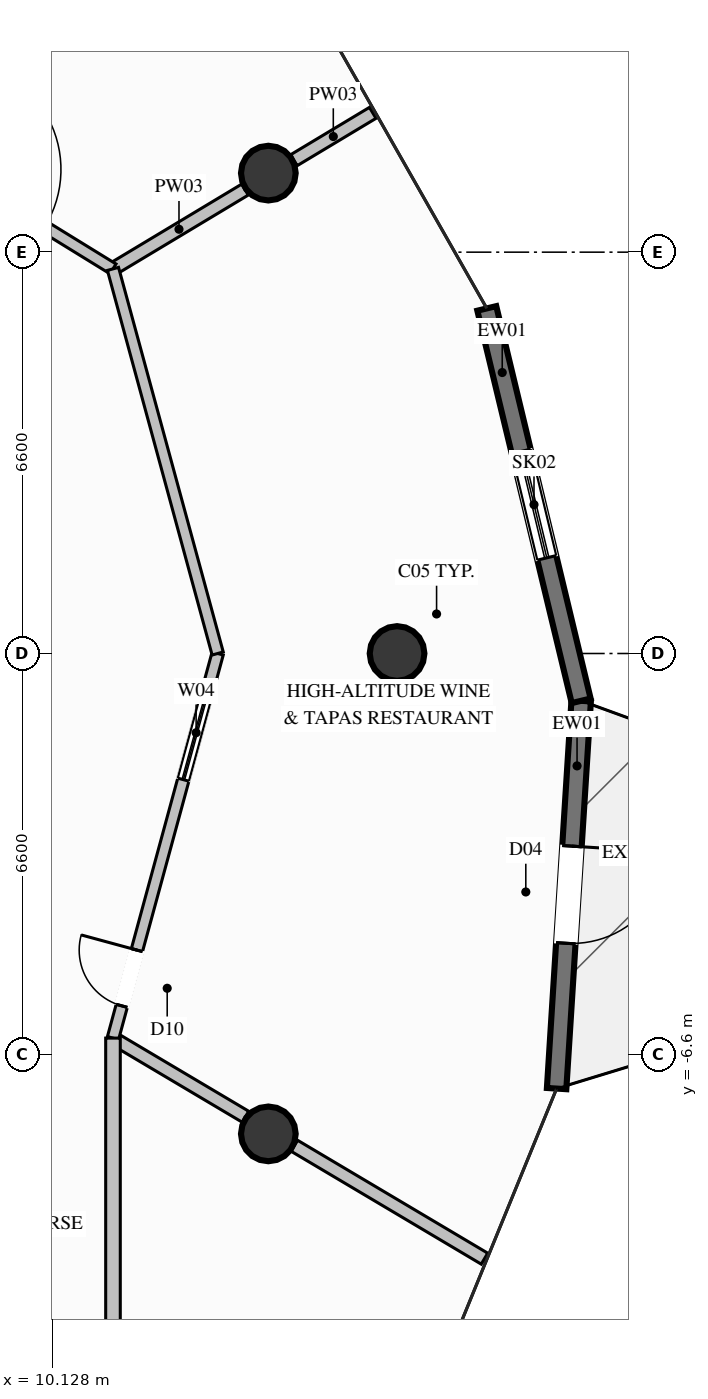
"""IFC4 building model, lengths in metres.
Left out: names, types, materials, properties, quantities, classifications, styles, units other than length and angle.
Written with IfcOpenShell. Run it as: python <this file> out.ifc"""

import sys

from ifc_helpers import new_model, si_unit, direction, frame, frame_2d, origin, origin_2d, place, context, subcontext, project, spatial, rectangle, circle, extrude, element, fill, save


model = new_model("IFC4")
c1 = context("Model", 3, precision=1e-05, world=origin(), true_north=direction((0.0, 1.0)))
c2 = subcontext(c1, "Body", "Model", "MODEL_VIEW")
j1 = project(units=[si_unit("LENGTHUNIT", "METRE"), si_unit("PLANEANGLEUNIT", "RADIAN")], contexts=[c1])
p1 = place(None, origin())
s1 = spatial("IfcSite", under=j1, at=p1, CompositionType="ELEMENT")
p2 = place(p1, origin())
s2 = spatial("IfcBuilding", under=s1, at=p2, CompositionType="ELEMENT")
p3 = place(p2, frame((0.0, 0.0, 168.6)))
s3 = spatial("IfcBuildingStorey", under=s2, at=p3, CompositionType="ELEMENT", Elevation=168.6)
for number, where, z_axis, x_axis in (
    (1, (15.8, 0.0, 0.0), (0.0, 0.0, 1.0), (1.0, 0.0, 0.0)),
    (2, (13.683, 7.9, 0.0), (0.0, 0.0, 1.0), (1.0, 0.0, 0.0)),
    (3, (13.683, -7.9, 0.0), (0.0, 0.0, 1.0), (1.0, 0.0, 0.0)),
):
    element("IfcColumn", number, at=place(p3, frame(where, z_axis=z_axis, x_axis=x_axis)), inside=s3, PredefinedType="COLUMN", context=c2, shape_type="SweptSolid", body=[
        extrude(circle(Radius=0.45, at=origin_2d()), origin(), (0.0, 0.0, 1.0), 4.6),
    ])
p4 = place(p3, frame((18.828, -0.778, 0.0), z_axis=(0.0, 0.0, 1.0), x_axis=(-0.063196547475, -0.998001100394, 0.0)))
e4 = element("IfcWall", 4, at=p4, inside=s3, PredefinedType="SOLIDWALL", context=c2, shape_type="SweptSolid", body=[
    extrude(rectangle(XDim=6.39, YDim=0.32, at=frame_2d((3.195, 0.0))), origin(), (0.0, 0.0, 1.0), 4.36),
])
p5 = place(p4, frame((2.395, 0.0, 0.0)))
e5 = element("IfcOpeningElement", 5, at=p5, cuts=e4, PredefinedType="OPENING", context=c2, shape_type="SweptSolid", body=[
    extrude(rectangle(XDim=1.6, YDim=2.3, at=frame_2d((0.8, 1.15))), frame((0.0, 0.17, 0.0), z_axis=(0.0, -1.0, 0.0), x_axis=(1.0, 0.0, 0.0)), (0.0, 0.0, 1.0), 0.34),
])
p6 = place(p3, frame((17.276, 5.675, 0.0), z_axis=(0.0, 0.0, 1.0), x_axis=(0.23383620468, -0.972276004734, 0.0)))
e6 = element("IfcWall", 6, at=p6, inside=s3, PredefinedType="SOLIDWALL", context=c2, shape_type="SweptSolid", body=[
    extrude(rectangle(XDim=6.637, YDim=0.32, at=frame_2d((3.319, 0.0))), origin(), (0.0, 0.0, 1.0), 4.36),
])
p7 = place(p6, frame((2.419, 0.0, 0.6)))
e7 = element("IfcOpeningElement", 7, at=p7, cuts=e6, PredefinedType="OPENING", context=c2, shape_type="SweptSolid", body=[
    extrude(rectangle(XDim=1.8, YDim=2.2, at=frame_2d((0.9, 1.1))), frame((0.0, 0.17, 0.0), z_axis=(0.0, -1.0, 0.0), x_axis=(1.0, 0.0, 0.0)), (0.0, 0.0, 1.0), 0.34),
])
p8 = place(p3, frame((11.128, 6.325, 0.0), z_axis=(0.0, 0.0, 1.0), x_axis=(0.857271697039, 0.514864290328, 0.0)))
e8 = element("IfcWall", 8, at=p8, inside=s3, PredefinedType="PARTITIONING", context=c2, shape_type="SweptSolid", body=[
    extrude(rectangle(XDim=2.533, YDim=0.21, at=frame_2d((1.266, 0.0))), origin(), (0.0, 0.0, 1.0), 3.877),
])
p9 = place(p3, frame((14.103, 8.112, 0.0), z_axis=(0.0, 0.0, 1.0), x_axis=(0.857222267269, 0.514946584122, 0.0)))
e9 = element("IfcWall", 9, at=p9, inside=s3, PredefinedType="PARTITIONING", context=c2, shape_type="SweptSolid", body=[
    extrude(rectangle(XDim=1.513, YDim=0.21, at=frame_2d((0.756, 0.0))), origin(), (0.0, 0.0, 1.0), 4.36),
])
p10 = place(p3, frame((11.128, -6.325, 0.0), z_axis=(0.0, 0.0, 1.0), x_axis=(0.859990866092, -0.510309425975, 0.0)))
e10 = element("IfcWall", 10, at=p10, inside=s3, PredefinedType="PARTITIONING", context=c2, shape_type="SweptSolid", body=[
    extrude(rectangle(XDim=2.534, YDim=0.21, at=frame_2d((1.267, 0.0))), origin(), (0.0, 0.0, 1.0), 3.877),
])
p11 = place(p3, frame((14.11, -8.095, 0.0), z_axis=(0.0, 0.0, 1.0), x_axis=(0.859887888036, -0.510482928224, 0.0)))
e11 = element("IfcWall", 11, at=p11, inside=s3, PredefinedType="PARTITIONING", context=c2, shape_type="SweptSolid", body=[
    extrude(rectangle(XDim=3.638, YDim=0.21, at=frame_2d((1.819, 0.0))), origin(), (0.0, 0.0, 1.0), 4.36),
])
p12 = place(p3, frame((7.35, 8.65, 0.0), z_axis=(0.0, 0.0, 1.0), x_axis=(0.851645088617, -0.524118920699, 0.0)))
e12 = element("IfcWall", 12, at=p12, inside=s3, PredefinedType="PARTITIONING", context=c2, shape_type="SweptSolid", body=[
    extrude(rectangle(XDim=4.436, YDim=0.19, at=frame_2d((2.218, 0.0))), origin(), (0.0, 0.0, 1.0), 4.36),
])
p13 = place(p12, frame((1.318, 0.0, 0.0)))
e13 = element("IfcOpeningElement", 13, at=p13, cuts=e12, PredefinedType="OPENING", context=c2, shape_type="SweptSolid", body=[
    extrude(rectangle(XDim=1.8, YDim=2.4, at=frame_2d((0.9, 1.2))), frame((0.0, 0.105, 0.0), z_axis=(0.0, -1.0, 0.0), x_axis=(1.0, 0.0, 0.0)), (0.0, 0.0, 1.0), 0.21),
])
p14 = place(p3, frame((11.128, -6.325, 0.0), z_axis=(0.0, 0.0, 1.0), x_axis=(0.262717156474, 0.964872890952, 0.0)))
e14 = element("IfcWall", 14, at=p14, inside=s3, PredefinedType="PARTITIONING", context=c2, shape_type="SweptSolid", body=[
    extrude(rectangle(XDim=6.555, YDim=0.19, at=frame_2d((3.278, 0.0))), origin(), (0.0, 0.0, 1.0), 4.36),
])
p15 = place(p14, frame((0.55, 0.0, 0.0)))
e15 = element("IfcOpeningElement", 15, at=p15, cuts=e14, PredefinedType="OPENING", context=c2, shape_type="SweptSolid", body=[
    extrude(rectangle(XDim=0.95, YDim=2.1, at=frame_2d((0.475, 1.05))), frame((0.0, 0.105, 0.0), z_axis=(0.0, -1.0, 0.0), x_axis=(1.0, 0.0, 0.0)), (0.0, 0.0, 1.0), 0.21),
])
p16 = place(p14, frame((4.405, 0.0, 0.9)))
e16 = element("IfcOpeningElement", 16, at=p16, cuts=e14, PredefinedType="OPENING", context=c2, shape_type="SweptSolid", body=[
    extrude(rectangle(XDim=1.6, YDim=1.4, at=frame_2d((0.8, 0.7))), frame((0.0, 0.105, 0.0), z_axis=(0.0, -1.0, 0.0), x_axis=(1.0, 0.0, 0.0)), (0.0, 0.0, 1.0), 0.21),
])
p17 = place(p3, frame((12.85, 0.0, 0.0), z_axis=(0.0, 0.0, 1.0), x_axis=(-0.262717156474, 0.964872890952, 0.0)))
e17 = element("IfcWall", 17, at=p17, inside=s3, PredefinedType="PARTITIONING", context=c2, shape_type="SweptSolid", body=[
    extrude(rectangle(XDim=6.555, YDim=0.19, at=frame_2d((3.278, 0.0))), origin(), (0.0, 0.0, 1.0), 4.36),
])
p18 = place(p3, frame((11.128, -11.8, 0.0), z_axis=(0.0, 0.0, 1.0), x_axis=(0.0, 1.0, 0.0)))
e18 = element("IfcWall", 18, at=p18, inside=s3, PredefinedType="PARTITIONING", context=c2, shape_type="SweptSolid", body=[
    extrude(rectangle(XDim=5.475, YDim=0.24, at=frame_2d((2.738, 0.0))), origin(), (0.0, 0.0, 1.0), 4.36),
])
p19 = place(p5, origin())
e19 = element("IfcDoor", 19, at=p19, inside=s3, OperationType="SINGLE_SWING_LEFT", PredefinedType="DOOR", context=c2, shape_type="SweptSolid", body=[
    extrude(rectangle(XDim=1.6, YDim=2.3, at=frame_2d((0.8, 1.15))), frame((0.0, 0.025, 0.0), z_axis=(0.0, -1.0, 0.0), x_axis=(1.0, 0.0, 0.0)), (0.0, 0.0, 1.0), 0.05),
])
fill(e5, e19)
p20 = place(p7, origin())
e20 = element("IfcWindow", 20, at=p20, inside=s3, PartitioningType="SINGLE_PANEL", PredefinedType="SKYLIGHT", context=c2, shape_type="SweptSolid", body=[
    extrude(rectangle(XDim=1.8, YDim=2.2, at=frame_2d((0.9, 1.1))), frame((0.0, 0.03, 0.0), z_axis=(0.0, -1.0, 0.0), x_axis=(1.0, 0.0, 0.0)), (0.0, 0.0, 1.0), 0.06),
])
fill(e7, e20)
p21 = place(p15, origin())
e21 = element("IfcDoor", 21, at=p21, inside=s3, OperationType="SINGLE_SWING_RIGHT", PredefinedType="DOOR", context=c2, shape_type="SweptSolid", body=[
    extrude(rectangle(XDim=0.95, YDim=2.1, at=frame_2d((0.475, 1.05))), frame((0.0, 0.025, 0.0), z_axis=(0.0, -1.0, 0.0), x_axis=(1.0, 0.0, 0.0)), (0.0, 0.0, 1.0), 0.05),
])
fill(e15, e21)
p22 = place(p16, origin())
e22 = element("IfcWindow", 22, at=p22, inside=s3, PartitioningType="SINGLE_PANEL", PredefinedType="WINDOW", context=c2, shape_type="SweptSolid", body=[
    extrude(rectangle(XDim=1.6, YDim=1.4, at=frame_2d((0.8, 0.7))), frame((0.0, 0.03, 0.0), z_axis=(0.0, -1.0, 0.0), x_axis=(1.0, 0.0, 0.0)), (0.0, 0.0, 1.0), 0.06),
])
fill(e16, e22)
save(model, sys.argv[1])
